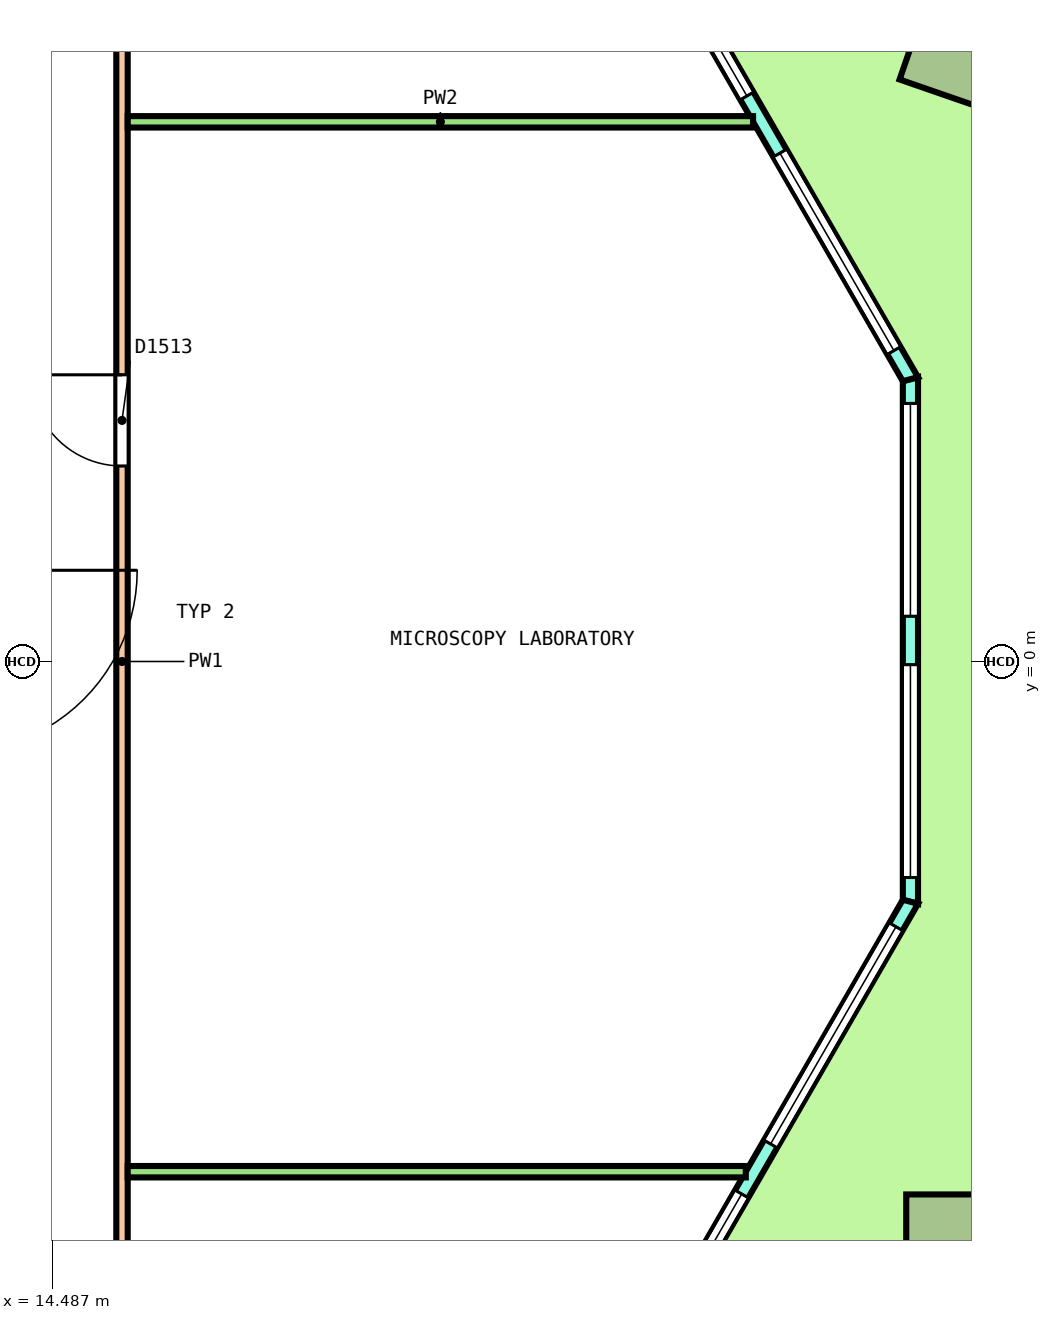
"""IFC4 building model, lengths in metres.
Left out: names, types, materials, properties, quantities, classifications, styles, units other than length and angle.
Written with IfcOpenShell. Run it as: python <this file> out.ifc"""

import sys

from ifc_helpers import new_model, si_unit, direction, frame, frame_2d, origin, origin_2d, place, context, subcontext, project, spatial, polyline, rectangle, outline, extrude, element, fill, save


model = new_model("IFC4")
c1 = context("Model", 3, precision=1e-05, world=origin(), true_north=direction((0.0, 1.0)))
c2 = subcontext(c1, "Body", "Model", "MODEL_VIEW")
j1 = project(units=[si_unit("LENGTHUNIT", "METRE"), si_unit("PLANEANGLEUNIT", "RADIAN")], contexts=[c1])
p1 = place(None, origin())
s1 = spatial("IfcSite", under=j1, at=p1, CompositionType="ELEMENT")
p2 = place(p1, origin())
s2 = spatial("IfcBuilding", under=s1, at=p2, CompositionType="ELEMENT")
p3 = place(p2, frame((0.0, 0.0, 89.6)))
s3 = spatial("IfcBuildingStorey", under=s2, at=p3, CompositionType="ELEMENT", Elevation=89.6)
p4 = place(p3, frame((26.488, 8.074, 0.0), z_axis=(0.021810922545, 0.025124736744, 0.999446362373), x_axis=(-0.499316971817, 0.866351047288, -0.010882303046)))
e1 = element("IfcColumn", 1, at=p4, inside=s3, PredefinedType="COLUMN", context=c2, shape_type="SweptSolid", body=[
    extrude(rectangle(XDim=1.35, YDim=1.35, at=origin_2d()), origin(), (0.0, 0.0, 1.0), 4.052),
])
p5 = place(p3, frame((26.393, -7.687, 0.0), z_axis=(0.010908911174, 0.018864581201, 0.999762533421), x_axis=(0.500638363085, 0.865382200335, -0.021791667014)))
e2 = element("IfcColumn", 2, at=p5, inside=s3, PredefinedType="COLUMN", context=c2, shape_type="SweptSolid", body=[
    extrude(rectangle(XDim=1.35, YDim=1.35, at=origin_2d()), origin(), (0.0, 0.0, 1.0), 4.051),
])
p6 = place(p3, frame((25.772, -3.161, 0.0), z_axis=(0.0, 0.0, 1.0), x_axis=(0.0, 1.0, 0.0)))
e3 = element("IfcWall", 3, at=p6, inside=s3, PredefinedType="SOLIDWALL", context=c2, shape_type="SweptSolid", body=[
    extrude(outline(polyline([(-0.027, -0.1), (1.128, -0.1), (2.283, -0.1), (3.438, -0.1), (4.592, -0.1), (5.747, -0.1), (6.902, -0.1), (6.848, 0.1), (5.711, 0.1), (4.574, 0.1), (3.438, 0.1), (2.301, 0.1), (1.164, 0.1), (0.027, 0.1), (-0.027, -0.1)])), origin(), (0.0, 0.0, 1.0), 4.1),
])
p7 = place(p6, frame((0.319, 0.0, 0.1)))
e4 = element("IfcOpeningElement", 4, at=p7, cuts=e3, PredefinedType="OPENING", context=c2, shape_type="SweptSolid", body=[
    extrude(rectangle(XDim=2.8, YDim=2.9, at=frame_2d((1.4, 1.45))), frame((0.0, 0.11, 0.0), z_axis=(0.0, -1.0, 0.0), x_axis=(1.0, 0.0, 0.0)), (0.0, 0.0, 1.0), 0.22),
])
p8 = place(p6, frame((3.756, 0.0, 0.1)))
e5 = element("IfcOpeningElement", 5, at=p8, cuts=e3, PredefinedType="OPENING", context=c2, shape_type="SweptSolid", body=[
    extrude(rectangle(XDim=2.8, YDim=2.9, at=frame_2d((1.4, 1.45))), frame((0.0, 0.11, 0.0), z_axis=(0.0, -1.0, 0.0), x_axis=(1.0, 0.0, 0.0)), (0.0, 0.0, 1.0), 0.22),
])
p9 = place(p3, frame((25.772, 3.714, 0.0), z_axis=(0.0, 0.0, 1.0), x_axis=(-0.500000373815, 0.866025187962, 0.0)))
e6 = element("IfcWall", 6, at=p9, inside=s3, PredefinedType="SOLIDWALL", context=c2, shape_type="SweptSolid", body=[
    extrude(outline(polyline([(-0.027, -0.1), (0.994, -0.1), (2.015, -0.1), (3.035, -0.1), (4.056, -0.1), (5.077, -0.1), (6.097, -0.1), (7.118, -0.1), (8.139, -0.1), (9.16, -0.1), (10.18, -0.1), (11.201, -0.1), (12.222, -0.1), (13.242, -0.1), (14.263, -0.1), (15.284, -0.1), (16.304, -0.1), (17.325, -0.1), (18.346, -0.1), (19.367, -0.1), (19.313, 0.1), (18.298, 0.1), (17.283, 0.1), (16.268, 0.1), (15.253, 0.1), (14.238, 0.1), (13.223, 0.1), (12.208, 0.1), (11.193, 0.1), (10.177, 0.1), (9.162, 0.1), (8.147, 0.1), (7.132, 0.1), (6.117, 0.1), (5.102, 0.1), (4.087, 0.1), (3.072, 0.1), (2.057, 0.1), (1.042, 0.1), (0.027, 0.1), (-0.027, -0.1)])), origin(), (0.0, 0.0, 1.0), 4.1),
])
p10 = place(p9, frame((0.434, 0.0, 0.1)))
e7 = element("IfcOpeningElement", 7, at=p10, cuts=e6, PredefinedType="OPENING", context=c2, shape_type="SweptSolid", body=[
    extrude(rectangle(XDim=3.0, YDim=2.9, at=frame_2d((1.5, 1.45))), frame((0.0, 0.11, 0.0), z_axis=(0.0, -1.0, 0.0), x_axis=(1.0, 0.0, 0.0)), (0.0, 0.0, 1.0), 0.22),
])
p11 = place(p9, frame((4.302, 0.0, 0.1)))
e8 = element("IfcOpeningElement", 8, at=p11, cuts=e6, PredefinedType="OPENING", context=c2, shape_type="SweptSolid", body=[
    extrude(rectangle(XDim=3.0, YDim=2.9, at=frame_2d((1.5, 1.45))), frame((0.0, 0.11, 0.0), z_axis=(0.0, -1.0, 0.0), x_axis=(1.0, 0.0, 0.0)), (0.0, 0.0, 1.0), 0.22),
])
p12 = place(p9, frame((8.77, 0.0, 0.0)))
e9 = element("IfcOpeningElement", 9, at=p12, cuts=e6, PredefinedType="OPENING", context=c2, shape_type="SweptSolid", body=[
    extrude(rectangle(XDim=1.8, YDim=2.4, at=frame_2d((0.9, 1.2))), frame((0.0, 0.11, 0.0), z_axis=(0.0, -1.0, 0.0), x_axis=(1.0, 0.0, 0.0)), (0.0, 0.0, 1.0), 0.22),
])
p13 = place(p9, frame((8.77, 0.0, 2.55)))
e10 = element("IfcOpeningElement", 10, at=p13, cuts=e6, PredefinedType="OPENING", context=c2, shape_type="SweptSolid", body=[
    extrude(rectangle(XDim=1.8, YDim=0.45, at=frame_2d((0.9, 0.225))), frame((0.0, 0.11, 0.0), z_axis=(0.0, -1.0, 0.0), x_axis=(1.0, 0.0, 0.0)), (0.0, 0.0, 1.0), 0.22),
])
p14 = place(p9, frame((12.038, 0.0, 0.1)))
e11 = element("IfcOpeningElement", 11, at=p14, cuts=e6, PredefinedType="OPENING", context=c2, shape_type="SweptSolid", body=[
    extrude(rectangle(XDim=3.0, YDim=2.9, at=frame_2d((1.5, 1.45))), frame((0.0, 0.11, 0.0), z_axis=(0.0, -1.0, 0.0), x_axis=(1.0, 0.0, 0.0)), (0.0, 0.0, 1.0), 0.22),
])
p15 = place(p9, frame((15.906, 0.0, 0.1)))
e12 = element("IfcOpeningElement", 12, at=p15, cuts=e6, PredefinedType="OPENING", context=c2, shape_type="SweptSolid", body=[
    extrude(rectangle(XDim=3.0, YDim=2.9, at=frame_2d((1.5, 1.45))), frame((0.0, 0.11, 0.0), z_axis=(0.0, -1.0, 0.0), x_axis=(1.0, 0.0, 0.0)), (0.0, 0.0, 1.0), 0.22),
])
p16 = place(p3, frame((15.624, -20.739, 0.0), z_axis=(0.0, 0.0, 1.0), x_axis=(0.500001833672, 0.866024345111, 0.0)))
e13 = element("IfcWall", 13, at=p16, inside=s3, PredefinedType="SOLIDWALL", context=c2, shape_type="SweptSolid", body=[
    extrude(outline(polyline([(-0.027, -0.1), (0.991, -0.1), (2.008, -0.1), (3.026, -0.1), (4.043, -0.1), (5.061, -0.1), (6.079, -0.1), (7.096, -0.1), (8.114, -0.1), (9.131, -0.1), (10.149, -0.1), (11.167, -0.1), (12.184, -0.1), (13.202, -0.1), (14.219, -0.1), (15.237, -0.1), (16.254, -0.1), (17.272, -0.1), (18.29, -0.1), (19.307, -0.1), (20.325, -0.1), (20.271, 0.1), (19.259, 0.1), (18.247, 0.1), (17.234, 0.1), (16.222, 0.1), (15.21, 0.1), (14.198, 0.1), (13.186, 0.1), (12.173, 0.1), (11.161, 0.1), (10.149, 0.1), (9.137, 0.1), (8.125, 0.1), (7.112, 0.1), (6.1, 0.1), (5.088, 0.1), (4.076, 0.1), (3.063, 0.1), (2.051, 0.1), (1.039, 0.1), (0.027, 0.1), (-0.027, -0.1)])), origin(), (0.0, 0.0, 1.0), 4.1),
])
p17 = place(p16, frame((0.38, 0.0, 0.1)))
e14 = element("IfcOpeningElement", 14, at=p17, cuts=e13, PredefinedType="OPENING", context=c2, shape_type="SweptSolid", body=[
    extrude(rectangle(XDim=3.3, YDim=2.9, at=frame_2d((1.65, 1.45))), frame((0.0, 0.11, 0.0), z_axis=(0.0, -1.0, 0.0), x_axis=(1.0, 0.0, 0.0)), (0.0, 0.0, 1.0), 0.22),
])
p18 = place(p16, frame((4.439, 0.0, 0.1)))
e15 = element("IfcOpeningElement", 15, at=p18, cuts=e13, PredefinedType="OPENING", context=c2, shape_type="SweptSolid", body=[
    extrude(rectangle(XDim=3.3, YDim=2.9, at=frame_2d((1.65, 1.45))), frame((0.0, 0.11, 0.0), z_axis=(0.0, -1.0, 0.0), x_axis=(1.0, 0.0, 0.0)), (0.0, 0.0, 1.0), 0.22),
])
p19 = place(p16, frame((9.249, 0.0, 0.0)))
e16 = element("IfcOpeningElement", 16, at=p19, cuts=e13, PredefinedType="OPENING", context=c2, shape_type="SweptSolid", body=[
    extrude(rectangle(XDim=1.8, YDim=2.4, at=frame_2d((0.9, 1.2))), frame((0.0, 0.11, 0.0), z_axis=(0.0, -1.0, 0.0), x_axis=(1.0, 0.0, 0.0)), (0.0, 0.0, 1.0), 0.22),
])
p20 = place(p16, frame((9.249, 0.0, 2.55)))
e17 = element("IfcOpeningElement", 17, at=p20, cuts=e13, PredefinedType="OPENING", context=c2, shape_type="SweptSolid", body=[
    extrude(rectangle(XDim=1.8, YDim=0.45, at=frame_2d((0.9, 0.225))), frame((0.0, 0.11, 0.0), z_axis=(0.0, -1.0, 0.0), x_axis=(1.0, 0.0, 0.0)), (0.0, 0.0, 1.0), 0.22),
])
p21 = place(p16, frame((12.559, 0.0, 0.1)))
e18 = element("IfcOpeningElement", 18, at=p21, cuts=e13, PredefinedType="OPENING", context=c2, shape_type="SweptSolid", body=[
    extrude(rectangle(XDim=3.3, YDim=2.9, at=frame_2d((1.65, 1.45))), frame((0.0, 0.11, 0.0), z_axis=(0.0, -1.0, 0.0), x_axis=(1.0, 0.0, 0.0)), (0.0, 0.0, 1.0), 0.22),
])
p22 = place(p16, frame((16.618, 0.0, 0.1)))
e19 = element("IfcOpeningElement", 19, at=p22, cuts=e13, PredefinedType="OPENING", context=c2, shape_type="SweptSolid", body=[
    extrude(rectangle(XDim=3.3, YDim=2.9, at=frame_2d((1.65, 1.45))), frame((0.0, 0.11, 0.0), z_axis=(0.0, -1.0, 0.0), x_axis=(1.0, 0.0, 0.0)), (0.0, 0.0, 1.0), 0.22),
])
p23 = place(p3, frame((15.4, -12.925, 0.0), z_axis=(0.0, 0.0, 1.0), x_axis=(0.0, 1.0, 0.0)))
e20 = element("IfcWall", 20, at=p23, inside=s3, PredefinedType="PARTITIONING", context=c2, shape_type="SweptSolid", body=[
    extrude(rectangle(XDim=25.85, YDim=0.15, at=frame_2d((12.925, 0.0))), origin(), (0.0, 0.0, 1.0), 3.05),
])
p24 = place(p23, frame((15.497, 0.0, 0.0)))
e21 = element("IfcOpeningElement", 21, at=p24, cuts=e20, PredefinedType="OPENING", context=c2, shape_type="SweptSolid", body=[
    extrude(rectangle(XDim=1.2, YDim=2.1, at=frame_2d((0.6, 1.05))), frame((0.0, 0.085, 0.0), z_axis=(0.0, -1.0, 0.0), x_axis=(1.0, 0.0, 0.0)), (0.0, 0.0, 1.0), 0.17),
])
p25 = place(p23, frame((22.975, 0.0, 0.0)))
e22 = element("IfcOpeningElement", 22, at=p25, cuts=e20, PredefinedType="OPENING", context=c2, shape_type="SweptSolid", body=[
    extrude(rectangle(XDim=1.2, YDim=2.1, at=frame_2d((0.6, 1.05))), frame((0.0, 0.085, 0.0), z_axis=(0.0, -1.0, 0.0), x_axis=(1.0, 0.0, 0.0)), (0.0, 0.0, 1.0), 0.17),
])
p26 = place(p23, frame((1.881, 0.0, 0.0)))
e23 = element("IfcOpeningElement", 23, at=p26, cuts=e20, PredefinedType="OPENING", context=c2, shape_type="SweptSolid", body=[
    extrude(rectangle(XDim=1.0, YDim=2.1, at=frame_2d((0.5, 1.05))), frame((0.0, 0.085, 0.0), z_axis=(0.0, -1.0, 0.0), x_axis=(1.0, 0.0, 0.0)), (0.0, 0.0, 1.0), 0.17),
])
p27 = place(p3, frame((15.475, 7.1, 0.0), z_axis=(0.0, 0.0, 1.0), x_axis=(1.0, 0.0, 0.0)))
e24 = element("IfcWall", 24, at=p27, inside=s3, PredefinedType="PARTITIONING", context=c2, shape_type="SweptSolid", body=[
    extrude(rectangle(XDim=8.227, YDim=0.15, at=frame_2d((4.114, 0.0))), origin(), (0.0, 0.0, 1.0), 3.05),
])
p28 = place(p3, frame((15.475, -6.712, 0.0), z_axis=(0.0, 0.0, 1.0), x_axis=(1.0, 0.0, 0.0)))
e25 = element("IfcWall", 25, at=p28, inside=s3, PredefinedType="PARTITIONING", context=c2, shape_type="SweptSolid", body=[
    extrude(rectangle(XDim=8.131, YDim=0.15, at=frame_2d((4.066, 0.0))), origin(), (0.0, 0.0, 1.0), 3.05),
])
p29 = place(p7, origin())
e26 = element("IfcWindow", 26, at=p29, inside=s3, PartitioningType="SINGLE_PANEL", PredefinedType="WINDOW", context=c2, shape_type="SweptSolid", body=[
    extrude(rectangle(XDim=2.8, YDim=2.9, at=frame_2d((1.4, 1.45))), frame((0.0, 0.03, 0.0), z_axis=(0.0, -1.0, 0.0), x_axis=(1.0, 0.0, 0.0)), (0.0, 0.0, 1.0), 0.06),
])
fill(e4, e26)
p30 = place(p8, origin())
e27 = element("IfcWindow", 27, at=p30, inside=s3, PartitioningType="SINGLE_PANEL", PredefinedType="WINDOW", context=c2, shape_type="SweptSolid", body=[
    extrude(rectangle(XDim=2.8, YDim=2.9, at=frame_2d((1.4, 1.45))), frame((0.0, 0.03, 0.0), z_axis=(0.0, -1.0, 0.0), x_axis=(1.0, 0.0, 0.0)), (0.0, 0.0, 1.0), 0.06),
])
fill(e5, e27)
p31 = place(p10, origin())
e28 = element("IfcWindow", 28, at=p31, inside=s3, PartitioningType="SINGLE_PANEL", PredefinedType="WINDOW", context=c2, shape_type="SweptSolid", body=[
    extrude(rectangle(XDim=3.0, YDim=2.9, at=frame_2d((1.5, 1.45))), frame((0.0, 0.03, 0.0), z_axis=(0.0, -1.0, 0.0), x_axis=(1.0, 0.0, 0.0)), (0.0, 0.0, 1.0), 0.06),
])
fill(e7, e28)
p32 = place(p11, origin())
e29 = element("IfcWindow", 29, at=p32, inside=s3, PartitioningType="SINGLE_PANEL", PredefinedType="WINDOW", context=c2, shape_type="SweptSolid", body=[
    extrude(rectangle(XDim=3.0, YDim=2.9, at=frame_2d((1.5, 1.45))), frame((0.0, 0.03, 0.0), z_axis=(0.0, -1.0, 0.0), x_axis=(1.0, 0.0, 0.0)), (0.0, 0.0, 1.0), 0.06),
])
fill(e8, e29)
p33 = place(p21, origin())
e30 = element("IfcWindow", 30, at=p33, inside=s3, PartitioningType="SINGLE_PANEL", PredefinedType="WINDOW", context=c2, shape_type="SweptSolid", body=[
    extrude(rectangle(XDim=3.3, YDim=2.9, at=frame_2d((1.65, 1.45))), frame((0.0, 0.03, 0.0), z_axis=(0.0, -1.0, 0.0), x_axis=(1.0, 0.0, 0.0)), (0.0, 0.0, 1.0), 0.06),
])
fill(e18, e30)
p34 = place(p22, origin())
e31 = element("IfcWindow", 31, at=p34, inside=s3, PartitioningType="SINGLE_PANEL", PredefinedType="WINDOW", context=c2, shape_type="SweptSolid", body=[
    extrude(rectangle(XDim=3.3, YDim=2.9, at=frame_2d((1.65, 1.45))), frame((0.0, 0.03, 0.0), z_axis=(0.0, -1.0, 0.0), x_axis=(1.0, 0.0, 0.0)), (0.0, 0.0, 1.0), 0.06),
])
fill(e19, e31)
p35 = place(p24, origin())
e32 = element("IfcDoor", 32, at=p35, inside=s3, OperationType="DOUBLE_DOOR_SINGLE_SWING", PredefinedType="DOOR", context=c2, shape_type="SweptSolid", body=[
    extrude(rectangle(XDim=1.2, YDim=2.1, at=frame_2d((0.6, 1.05))), frame((0.0, 0.025, 0.0), z_axis=(0.0, -1.0, 0.0), x_axis=(1.0, 0.0, 0.0)), (0.0, 0.0, 1.0), 0.05),
])
fill(e21, e32)
save(model, sys.argv[1])
